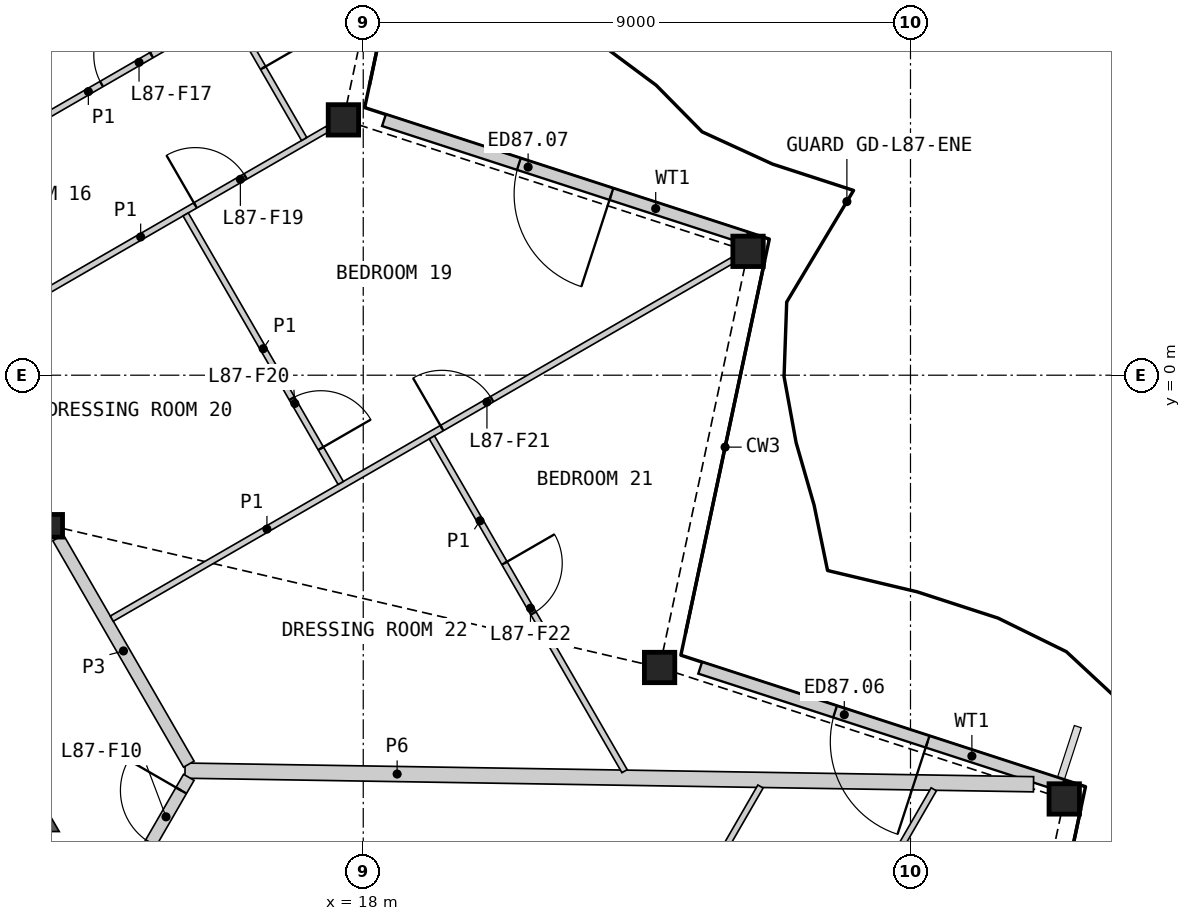
"""IFC4 building model, lengths in metres.
Left out: names, types, materials, properties, quantities, classifications, styles, units other than length and angle.
Written with IfcOpenShell. Run it as: python <this file> out.ifc"""

import sys

from ifc_helpers import new_model, si_unit, direction, frame, frame_2d, origin, origin_2d, place, context, subcontext, project, spatial, polyline, rectangle, hollow_rectangle, i_section, outline, extrude, element, fill, save


model = new_model("IFC4")
c1 = context("Model", 3, precision=1e-05, world=origin(), true_north=direction((0.0, 1.0)))
c2 = subcontext(c1, "Body", "Model", "MODEL_VIEW")
j1 = project(units=[si_unit("LENGTHUNIT", "METRE"), si_unit("PLANEANGLEUNIT", "RADIAN")], contexts=[c1])
p1 = place(None, origin())
s1 = spatial("IfcSite", under=j1, at=p1, CompositionType="ELEMENT")
p2 = place(p1, origin())
s2 = spatial("IfcBuilding", under=s1, at=p2, CompositionType="ELEMENT")
p3 = place(p2, frame((0.0, 0.0, 384.8)))
s3 = spatial("IfcBuildingStorey", under=s2, at=p3, CompositionType="ELEMENT", Elevation=384.8)
for number, where, z_axis, x_axis in (
    (1, (29.529, -6.969, 0.0), (0.0, 0.0, 1.0), (1.0, 0.0, 0.0)),
    (2, (22.874, -4.807, 0.0), (0.0, 0.0, 1.0), (1.0, 0.0, 0.0)),
    (3, (24.329, 2.037, 0.0), (0.0, 0.0, 1.0), (1.0, 0.0, 0.0)),
    (4, (17.674, 4.199, 0.0), (0.0, 0.0, 1.0), (1.0, 0.0, 0.0)),
):
    element("IfcColumn", number, at=place(p3, frame(where, z_axis=z_axis, x_axis=x_axis)), inside=s3, PredefinedType="COLUMN", context=c2, shape_type="SweptSolid", body=[
        extrude(hollow_rectangle(XDim=0.5, YDim=0.5, WallThickness=0.03, at=origin_2d()), origin(), (0.0, 0.0, 1.0), 3.4),
    ])
p4 = place(p3, frame((12.868, -2.476, 0.0), z_axis=(0.0, 0.0, 1.0), x_axis=(1.0, 0.0, 0.0)))
e5 = element("IfcColumn", 5, at=p4, inside=s3, PredefinedType="COLUMN", context=c2, shape_type="SweptSolid", body=[
    extrude(i_section(OverallWidth=0.374, OverallDepth=0.372, WebThickness=0.016, FlangeThickness=0.026, at=origin_2d()), origin(), (0.0, 0.0, 1.0), 3.4),
])
p5 = place(p3, frame((29.5, -6.75, 0.0), z_axis=(0.0, 0.0, 1.0), x_axis=(-0.951060123915, 0.309005891041, 0.0)))
e6 = element("IfcWall", 6, at=p5, inside=s3, PredefinedType="SOLIDWALL", context=c2, shape_type="SweptSolid", body=[
    extrude(rectangle(XDim=6.265, YDim=0.2, at=frame_2d((3.133, 0.0))), origin(), (0.0, 0.0, 1.0), 2.634),
])
p6 = place(p5, frame((2.333, 0.0, 0.0)))
e7 = element("IfcOpeningElement", 7, at=p6, cuts=e6, PredefinedType="OPENING", context=c2, shape_type="SweptSolid", body=[
    extrude(rectangle(XDim=1.6, YDim=2.25, at=frame_2d((0.8, 1.125))), frame((0.0, 0.11, 0.0), z_axis=(0.0, -1.0, 0.0), x_axis=(1.0, 0.0, 0.0)), (0.0, 0.0, 1.0), 0.22),
])
p7 = place(p3, frame((24.3, 2.257, 0.0), z_axis=(0.0, 0.0, 1.0), x_axis=(-0.951060123915, 0.309005891041, 0.0)))
e8 = element("IfcWall", 8, at=p7, inside=s3, PredefinedType="SOLIDWALL", context=c2, shape_type="SweptSolid", body=[
    extrude(rectangle(XDim=6.265, YDim=0.2, at=frame_2d((3.133, 0.0))), origin(), (0.0, 0.0, 1.0), 2.634),
])
p8 = place(p7, frame((2.333, 0.0, 0.0)))
e9 = element("IfcOpeningElement", 9, at=p8, cuts=e8, PredefinedType="OPENING", context=c2, shape_type="SweptSolid", body=[
    extrude(rectangle(XDim=1.6, YDim=2.25, at=frame_2d((0.8, 1.125))), frame((0.0, 0.11, 0.0), z_axis=(0.0, -1.0, 0.0), x_axis=(1.0, 0.0, 0.0)), (0.0, 0.0, 1.0), 0.22),
])
p9 = place(p3, origin())
e10 = element("IfcWall", 10, at=p9, inside=s3, PredefinedType="SHEAR", context=c2, shape_type="SweptSolid", body=[
    extrude(outline(polyline([(11.961, -7.506), (11.961, -6.906), (12.48, -6.606), (13.0, -7.506), (11.961, -7.506)])), origin(), (0.0, 0.0, 1.0), 3.1),
])
p10 = place(p3, frame((15.069, -6.503, 0.0), z_axis=(0.0, 0.0, 1.0), x_axis=(0.999870484296, -0.016093931549, 0.0)))
e11 = element("IfcWall", 11, at=p10, inside=s3, PredefinedType="PARTITIONING", context=c2, shape_type="SweptSolid", body=[
    extrude(rectangle(XDim=13.956, YDim=0.25, at=frame_2d((6.978, 0.0))), origin(), (0.0, 0.0, 1.0), 2.33),
])
p11 = place(p3, frame((12.981, -2.673, 0.0), z_axis=(0.0, 0.0, 1.0), x_axis=(0.499986217557, -0.866033360935, 0.0)))
e12 = element("IfcWall", 12, at=p11, inside=s3, PredefinedType="PARTITIONING", context=c2, shape_type="SweptSolid", body=[
    extrude(rectangle(XDim=4.3, YDim=0.2, at=frame_2d((2.15, 0.0))), origin(), (0.0, 0.0, 1.0), 3.1),
])
p12 = place(p3, frame((13.281, -9.819, 0.0), z_axis=(0.0, 0.0, 1.0), x_axis=(0.499948957823, 0.866054870994, 0.0)))
e13 = element("IfcWall", 13, at=p12, inside=s3, PredefinedType="PARTITIONING", context=c2, shape_type="SweptSolid", body=[
    extrude(rectangle(XDim=3.701, YDim=0.2, at=frame_2d((1.851, 0.0))), origin(), (0.0, 0.0, 1.0), 3.1),
])
p13 = place(p12, frame((2.451, 0.0, 0.0)))
e14 = element("IfcOpeningElement", 14, at=p13, cuts=e13, PredefinedType="OPENING", context=c2, shape_type="SweptSolid", body=[
    extrude(rectangle(XDim=1.0, YDim=2.1, at=frame_2d((0.5, 1.05))), frame((0.0, 0.11, 0.0), z_axis=(0.0, -1.0, 0.0), x_axis=(1.0, 0.0, 0.0)), (0.0, 0.0, 1.0), 0.22),
])
p14 = place(p3, frame((8.775, 5.066, 0.0), z_axis=(0.0, 0.0, 1.0), x_axis=(0.866023724155, 0.500002909193, 0.0)))
e15 = element("IfcWall", 15, at=p14, inside=s3, PredefinedType="PARTITIONING", context=c2, shape_type="SweptSolid", body=[
    extrude(rectangle(XDim=11.655, YDim=0.2, at=frame_2d((5.827, 0.0))), origin(), (0.0, 0.0, 1.0), 2.33),
])
p15 = place(p3, frame((13.865, -4.004, 0.0), z_axis=(0.0, 0.0, 1.0), x_axis=(0.866023404247, 0.500003463284, 0.0)))
e16 = element("IfcWall", 16, at=p15, inside=s3, PredefinedType="PARTITIONING", context=c2, shape_type="SweptSolid", body=[
    extrude(rectangle(XDim=11.782, YDim=0.1, at=frame_2d((5.891, 0.0))), origin(), (0.0, 0.0, 1.0), 2.33),
])
p16 = place(p15, frame((6.269, 0.0, 0.0)))
e17 = element("IfcOpeningElement", 17, at=p16, cuts=e16, PredefinedType="OPENING", context=c2, shape_type="SweptSolid", body=[
    extrude(rectangle(XDim=0.95, YDim=2.1, at=frame_2d((0.475, 1.05))), frame((0.0, 0.06, 0.0), z_axis=(0.0, -1.0, 0.0), x_axis=(1.0, 0.0, 0.0)), (0.0, 0.0, 1.0), 0.12),
])
p17 = place(p3, frame((23.512, -13.517, 0.0), z_axis=(0.0, 0.0, 1.0), x_axis=(0.49998445949, 0.866034375916, 0.0)))
e18 = element("IfcWall", 18, at=p17, inside=s3, PredefinedType="PARTITIONING", context=c2, shape_type="SweptSolid", body=[
    extrude(rectangle(XDim=7.743, YDim=0.1, at=frame_2d((3.872, 0.0))), origin(), (0.0, 0.0, 1.0), 2.33),
])
p18 = place(p17, frame((3.397, 0.0, 0.0)))
e19 = element("IfcOpeningElement", 19, at=p18, cuts=e18, PredefinedType="OPENING", context=c2, shape_type="SweptSolid", body=[
    extrude(rectangle(XDim=0.95, YDim=2.1, at=frame_2d((0.475, 1.05))), frame((0.0, 0.06, 0.0), z_axis=(0.0, -1.0, 0.0), x_axis=(1.0, 0.0, 0.0)), (0.0, 0.0, 1.0), 0.12),
])
p19 = place(p3, frame((11.265, 0.5, 0.0), z_axis=(0.0, 0.0, 1.0), x_axis=(0.866033839264, 0.499985389037, 0.0)))
e20 = element("IfcWall", 20, at=p19, inside=s3, PredefinedType="PARTITIONING", context=c2, shape_type="SweptSolid", body=[
    extrude(rectangle(XDim=7.1, YDim=0.1, at=frame_2d((3.55, 0.0))), origin(), (0.0, 0.0, 1.0), 2.33),
])
p20 = place(p19, frame((4.588, 0.0, 0.0)))
e21 = element("IfcOpeningElement", 21, at=p20, cuts=e20, PredefinedType="OPENING", context=c2, shape_type="SweptSolid", body=[
    extrude(rectangle(XDim=0.95, YDim=2.1, at=frame_2d((0.475, 1.05))), frame((0.0, 0.06, 0.0), z_axis=(0.0, -1.0, 0.0), x_axis=(1.0, 0.0, 0.0)), (0.0, 0.0, 1.0), 0.12),
])
p21 = place(p3, frame((21.354, -12.271, 0.0), z_axis=(0.0, 0.0, 1.0), x_axis=(0.499983931063, 0.866034680991, 0.0)))
e22 = element("IfcWall", 22, at=p21, inside=s3, PredefinedType="PARTITIONING", context=c2, shape_type="SweptSolid", body=[
    extrude(rectangle(XDim=6.358, YDim=0.1, at=frame_2d((3.179, 0.0))), origin(), (0.0, 0.0, 1.0), 2.33),
])
p22 = place(p21, frame((1.252, 0.0, 0.0)))
e23 = element("IfcOpeningElement", 23, at=p22, cuts=e22, PredefinedType="OPENING", context=c2, shape_type="SweptSolid", body=[
    extrude(rectangle(XDim=0.95, YDim=2.1, at=frame_2d((0.475, 1.05))), frame((0.0, 0.06, 0.0), z_axis=(0.0, -1.0, 0.0), x_axis=(1.0, 0.0, 0.0)), (0.0, 0.0, 1.0), 0.12),
])
p23 = place(p3, frame((19.128, -1.023, 0.0), z_axis=(0.0, 0.0, 1.0), x_axis=(0.499991387631, -0.866030376081, 0.0)))
e24 = element("IfcWall", 24, at=p23, inside=s3, PredefinedType="PARTITIONING", context=c2, shape_type="SweptSolid", body=[
    extrude(rectangle(XDim=6.339, YDim=0.1, at=frame_2d((3.169, 0.0))), origin(), (0.0, 0.0, 1.0), 2.33),
])
p24 = place(p23, frame((2.389, 0.0, 0.0)))
e25 = element("IfcOpeningElement", 25, at=p24, cuts=e24, PredefinedType="OPENING", context=c2, shape_type="SweptSolid", body=[
    extrude(rectangle(XDim=0.95, YDim=2.1, at=frame_2d((0.475, 1.05))), frame((0.0, 0.06, 0.0), z_axis=(0.0, -1.0, 0.0), x_axis=(1.0, 0.0, 0.0)), (0.0, 0.0, 1.0), 0.12),
])
p25 = place(p3, frame((15.08, 2.644, 0.0), z_axis=(0.0, 0.0, 1.0), x_axis=(0.500005610874, -0.86602216432, 0.0)))
e26 = element("IfcWall", 26, at=p25, inside=s3, PredefinedType="PARTITIONING", context=c2, shape_type="SweptSolid", body=[
    extrude(rectangle(XDim=5.1, YDim=0.1, at=frame_2d((2.55, 0.0))), origin(), (0.0, 0.0, 1.0), 2.33),
])
p26 = place(p25, frame((3.494, 0.0, 0.0)))
e27 = element("IfcOpeningElement", 27, at=p26, cuts=e26, PredefinedType="OPENING", context=c2, shape_type="SweptSolid", body=[
    extrude(rectangle(XDim=0.95, YDim=2.1, at=frame_2d((0.475, 1.05))), frame((0.0, 0.06, 0.0), z_axis=(0.0, -1.0, 0.0), x_axis=(1.0, 0.0, 0.0)), (0.0, 0.0, 1.0), 0.12),
])
p27 = place(p3, frame((14.503, 8.258, 0.0), z_axis=(0.0, 0.0, 1.0), x_axis=(0.500012591307, -0.866018134068, 0.0)))
e28 = element("IfcWall", 28, at=p27, inside=s3, PredefinedType="PARTITIONING", context=c2, shape_type="SweptSolid", body=[
    extrude(rectangle(XDim=5.05, YDim=0.1, at=frame_2d((2.525, 0.0))), origin(), (0.0, 0.0, 1.0), 2.33),
])
p28 = place(p27, frame((2.75, 0.0, 0.0)))
e29 = element("IfcOpeningElement", 29, at=p28, cuts=e28, PredefinedType="OPENING", context=c2, shape_type="SweptSolid", body=[
    extrude(rectangle(XDim=0.95, YDim=2.1, at=frame_2d((0.475, 1.05))), frame((0.0, 0.06, 0.0), z_axis=(0.0, -1.0, 0.0), x_axis=(1.0, 0.0, 0.0)), (0.0, 0.0, 1.0), 0.12),
])
p29 = place(p3, frame((12.223, 3.939, 0.0), z_axis=(0.0, 0.0, 1.0), x_axis=(0.866032775405, 0.499987231761, 0.0)))
e30 = element("IfcWall", 30, at=p29, inside=s3, PredefinedType="PARTITIONING", context=c2, shape_type="SweptSolid", body=[
    extrude(rectangle(XDim=2.9, YDim=0.1, at=frame_2d((1.45, 0.0))), origin(), (0.0, 0.0, 1.0), 2.33),
])
p30 = place(p29, frame((1.7, 0.0, 0.0)))
e31 = element("IfcOpeningElement", 31, at=p30, cuts=e30, PredefinedType="OPENING", context=c2, shape_type="SweptSolid", body=[
    extrude(rectangle(XDim=0.95, YDim=2.1, at=frame_2d((0.475, 1.05))), frame((0.0, 0.06, 0.0), z_axis=(0.0, -1.0, 0.0), x_axis=(1.0, 0.0, 0.0)), (0.0, 0.0, 1.0), 0.12),
])
p31 = place(p6, origin())
e32 = element("IfcDoor", 32, at=p31, inside=s3, OperationType="DOUBLE_DOOR_SINGLE_SWING", PredefinedType="DOOR", context=c2, shape_type="SweptSolid", body=[
    extrude(rectangle(XDim=1.6, YDim=2.25, at=frame_2d((0.8, 1.125))), frame((0.0, 0.025, 0.0), z_axis=(0.0, -1.0, 0.0), x_axis=(1.0, 0.0, 0.0)), (0.0, 0.0, 1.0), 0.05),
])
fill(e7, e32)
p32 = place(p8, origin())
e33 = element("IfcDoor", 33, at=p32, inside=s3, OperationType="DOUBLE_DOOR_SINGLE_SWING", PredefinedType="DOOR", context=c2, shape_type="SweptSolid", body=[
    extrude(rectangle(XDim=1.6, YDim=2.25, at=frame_2d((0.8, 1.125))), frame((0.0, 0.025, 0.0), z_axis=(0.0, -1.0, 0.0), x_axis=(1.0, 0.0, 0.0)), (0.0, 0.0, 1.0), 0.05),
])
fill(e9, e33)
p33 = place(p13, origin())
e34 = element("IfcDoor", 34, at=p33, inside=s3, OperationType="SINGLE_SWING_RIGHT", PredefinedType="DOOR", context=c2, shape_type="SweptSolid", body=[
    extrude(rectangle(XDim=1.0, YDim=2.1, at=frame_2d((0.5, 1.05))), frame((0.0, 0.025, 0.0), z_axis=(0.0, -1.0, 0.0), x_axis=(1.0, 0.0, 0.0)), (0.0, 0.0, 1.0), 0.05),
])
fill(e14, e34)
p34 = place(p30, origin())
e35 = element("IfcDoor", 35, at=p34, inside=s3, OperationType="SINGLE_SWING_RIGHT", PredefinedType="DOOR", context=c2, shape_type="SweptSolid", body=[
    extrude(rectangle(XDim=0.95, YDim=2.1, at=frame_2d((0.475, 1.05))), frame((0.0, 0.025, 0.0), z_axis=(0.0, -1.0, 0.0), x_axis=(1.0, 0.0, 0.0)), (0.0, 0.0, 1.0), 0.05),
])
fill(e31, e35)
p35 = place(p28, origin())
e36 = element("IfcDoor", 36, at=p35, inside=s3, OperationType="SINGLE_SWING_RIGHT", PredefinedType="DOOR", context=c2, shape_type="SweptSolid", body=[
    extrude(rectangle(XDim=0.95, YDim=2.1, at=frame_2d((0.475, 1.05))), frame((0.0, 0.025, 0.0), z_axis=(0.0, -1.0, 0.0), x_axis=(1.0, 0.0, 0.0)), (0.0, 0.0, 1.0), 0.05),
])
fill(e29, e36)
p36 = place(p20, origin())
e37 = element("IfcDoor", 37, at=p36, inside=s3, OperationType="SINGLE_SWING_LEFT", PredefinedType="DOOR", context=c2, shape_type="SweptSolid", body=[
    extrude(rectangle(XDim=0.95, YDim=2.1, at=frame_2d((0.475, 1.05))), frame((0.0, 0.025, 0.0), z_axis=(0.0, -1.0, 0.0), x_axis=(1.0, 0.0, 0.0)), (0.0, 0.0, 1.0), 0.05),
])
fill(e21, e37)
p37 = place(p26, origin())
e38 = element("IfcDoor", 38, at=p37, inside=s3, OperationType="SINGLE_SWING_RIGHT", PredefinedType="DOOR", context=c2, shape_type="SweptSolid", body=[
    extrude(rectangle(XDim=0.95, YDim=2.1, at=frame_2d((0.475, 1.05))), frame((0.0, 0.025, 0.0), z_axis=(0.0, -1.0, 0.0), x_axis=(1.0, 0.0, 0.0)), (0.0, 0.0, 1.0), 0.05),
])
fill(e27, e38)
p38 = place(p16, origin())
e39 = element("IfcDoor", 39, at=p38, inside=s3, OperationType="SINGLE_SWING_LEFT", PredefinedType="DOOR", context=c2, shape_type="SweptSolid", body=[
    extrude(rectangle(XDim=0.95, YDim=2.1, at=frame_2d((0.475, 1.05))), frame((0.0, 0.025, 0.0), z_axis=(0.0, -1.0, 0.0), x_axis=(1.0, 0.0, 0.0)), (0.0, 0.0, 1.0), 0.05),
])
fill(e17, e39)
p39 = place(p24, origin())
e40 = element("IfcDoor", 40, at=p39, inside=s3, OperationType="SINGLE_SWING_LEFT", PredefinedType="DOOR", context=c2, shape_type="SweptSolid", body=[
    extrude(rectangle(XDim=0.95, YDim=2.1, at=frame_2d((0.475, 1.05))), frame((0.0, 0.025, 0.0), z_axis=(0.0, -1.0, 0.0), x_axis=(1.0, 0.0, 0.0)), (0.0, 0.0, 1.0), 0.05),
])
fill(e25, e40)
save(model, sys.argv[1])
